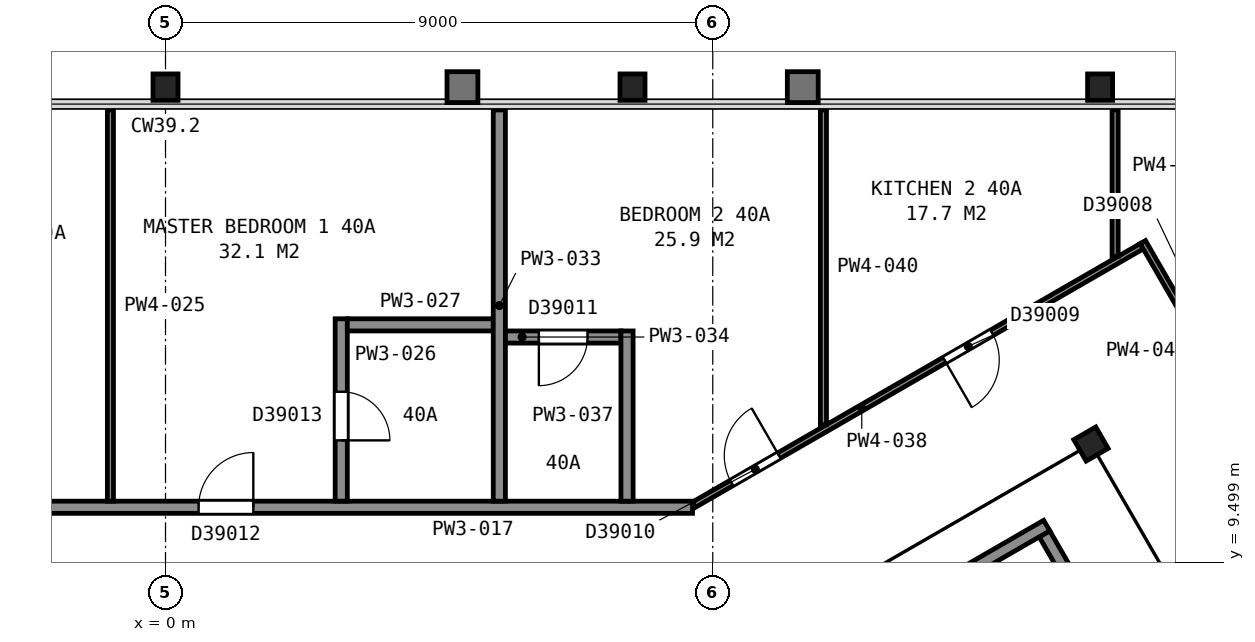
"""IFC4 building model, lengths in metres.
Left out: names, types, materials, properties, quantities, classifications, styles, units other than length and angle.
Written with IfcOpenShell. Run it as: python <this file> out.ifc"""

import sys

from ifc_helpers import new_model, si_unit, direction, frame, frame_2d, origin, origin_2d, place, context, subcontext, project, spatial, rectangle, i_section, extrude, element, fill, save


model = new_model("IFC4")
c1 = context("Model", 3, precision=1e-05, world=origin(), true_north=direction((0.0, 1.0)))
c2 = subcontext(c1, "Body", "Model", "MODEL_VIEW")
j1 = project(units=[si_unit("LENGTHUNIT", "METRE"), si_unit("PLANEANGLEUNIT", "RADIAN")], contexts=[c1])
p1 = place(None, origin())
s1 = spatial("IfcSite", under=j1, at=p1, CompositionType="ELEMENT")
p2 = place(p1, origin())
s2 = spatial("IfcBuilding", under=s1, at=p2, CompositionType="ELEMENT")
p3 = place(p2, frame((0.0, 0.0, 163.6)))
s3 = spatial("IfcBuildingStorey", under=s2, at=p3, CompositionType="ELEMENT", Elevation=163.6)
for number, where, z_axis, x_axis in (
    (1, (15.37, 17.31, 0.0), (0.0, 0.0, 1.0), (1.0, 0.0, 0.0)),
    (2, (7.68, 17.31, 0.0), (0.0, 0.0, 1.0), (1.0, 0.0, 0.0)),
    (3, (0.0, 17.31, 0.0), (0.0, 0.0, 1.0), (1.0, 0.0, 0.0)),
):
    element("IfcColumn", number, at=place(p3, frame(where, z_axis=z_axis, x_axis=x_axis)), inside=s3, PredefinedType="COLUMN", context=c2, shape_type="SweptSolid", body=[
        extrude(i_section(OverallWidth=0.411, OverallDepth=0.434, WebThickness=0.036, FlangeThickness=0.057, FilletRadius=0.015, at=origin_2d()), origin(), (0.0, 0.0, 1.0), 3.7),
    ])
p4 = place(p3, frame((15.22, 11.44, 0.0), z_axis=(0.0, 0.0, 1.0), x_axis=(0.5, -0.866025403784, 0.0)))
e4 = element("IfcColumn", 4, at=p4, inside=s3, PredefinedType="COLUMN", context=c2, shape_type="SweptSolid", body=[
    extrude(i_section(OverallWidth=0.406, OverallDepth=0.417, WebThickness=0.03, FlangeThickness=0.048, FilletRadius=0.015, at=origin_2d()), origin(), (0.0, 0.0, 1.0), 3.7),
])
p5 = place(p3, frame((15.855, 7.538, 0.0), z_axis=(0.0, 0.0, 1.0), x_axis=(-0.500049511043, 0.865996816683, 0.0)))
e5 = element("IfcWall", 5, at=p5, inside=s3, PredefinedType="PARTITIONING", context=c2, shape_type="SweptSolid", body=[
    extrude(rectangle(XDim=2.8, YDim=0.2, at=frame_2d((1.4, 0.0))), origin(), (0.0, 0.0, 1.0), 3.45),
])
p6 = place(p5, frame((0.85, 0.0, 0.0)))
e6 = element("IfcOpeningElement", 6, at=p6, cuts=e5, PredefinedType="OPENING", context=c2, shape_type="SweptSolid", body=[
    extrude(rectangle(XDim=1.1, YDim=2.1, at=frame_2d((0.55, 1.05))), frame((0.0, 0.11, 0.0), z_axis=(0.0, -1.0, 0.0), x_axis=(1.0, 0.0, 0.0)), (0.0, 0.0, 1.0), 0.22),
])
p7 = place(p3, frame((6.178, 5.299, 0.0), z_axis=(0.0, 0.0, 1.0), x_axis=(0.866019993635, 0.500009370536, 0.0)))
e7 = element("IfcWall", 7, at=p7, inside=s3, PredefinedType="PARTITIONING", context=c2, shape_type="SweptSolid", body=[
    extrude(rectangle(XDim=9.6, YDim=0.2, at=frame_2d((4.8, 0.0))), origin(), (0.0, 0.0, 1.0), 3.45),
])
p8 = place(p3, frame((-8.667, 10.4, 0.0), z_axis=(0.0, 0.0, 1.0), x_axis=(1.0, 0.0, 0.0)))
e8 = element("IfcWall", 8, at=p8, inside=s3, PredefinedType="PARTITIONING", context=c2, shape_type="SweptSolid", body=[
    extrude(rectangle(XDim=17.334, YDim=0.2, at=frame_2d((8.667, 0.0))), origin(), (0.0, 0.0, 1.0), 2.713),
])
p9 = place(p8, frame((9.211, 0.0, 0.0)))
e9 = element("IfcOpeningElement", 9, at=p9, cuts=e8, PredefinedType="OPENING", context=c2, shape_type="SweptSolid", body=[
    extrude(rectangle(XDim=0.9, YDim=2.1, at=frame_2d((0.45, 1.05))), frame((0.0, 0.11, 0.0), z_axis=(0.0, -1.0, 0.0), x_axis=(1.0, 0.0, 0.0)), (0.0, 0.0, 1.0), 0.22),
])
p10 = place(p8, frame((4.857, 0.0, 0.0)))
e10 = element("IfcOpeningElement", 10, at=p10, cuts=e8, PredefinedType="OPENING", context=c2, shape_type="SweptSolid", body=[
    extrude(rectangle(XDim=0.9, YDim=2.1, at=frame_2d((0.45, 1.05))), frame((0.0, 0.11, 0.0), z_axis=(0.0, -1.0, 0.0), x_axis=(1.0, 0.0, 0.0)), (0.0, 0.0, 1.0), 0.22),
])
p11 = place(p8, frame((1.0, 0.0, 0.0)))
e11 = element("IfcOpeningElement", 11, at=p11, cuts=e8, PredefinedType="OPENING", context=c2, shape_type="SweptSolid", body=[
    extrude(rectangle(XDim=0.9, YDim=2.1, at=frame_2d((0.45, 1.05))), frame((0.0, 0.11, 0.0), z_axis=(0.0, -1.0, 0.0), x_axis=(1.0, 0.0, 0.0)), (0.0, 0.0, 1.0), 0.22),
])
p12 = place(p3, frame((-0.906, 10.5, 0.0), z_axis=(0.0, 0.0, 1.0), x_axis=(0.0, 1.0, 0.0)))
e12 = element("IfcWall", 12, at=p12, inside=s3, PredefinedType="PARTITIONING", context=c2, shape_type="SweptSolid", body=[
    extrude(rectangle(XDim=6.435, YDim=0.1, at=frame_2d((3.218, 0.0))), origin(), (0.0, 0.0, 1.0), 2.713),
])
p13 = place(p3, frame((2.89, 13.5, 0.0), z_axis=(0.0, 0.0, 1.0), x_axis=(0.0, -1.0, 0.0)))
e13 = element("IfcWall", 13, at=p13, inside=s3, PredefinedType="PARTITIONING", context=c2, shape_type="SweptSolid", body=[
    extrude(rectangle(XDim=3.0, YDim=0.2, at=frame_2d((1.5, 0.0))), origin(), (0.0, 0.0, 1.0), 2.713),
])
p14 = place(p13, frame((1.2, 0.0, 0.0)))
e14 = element("IfcOpeningElement", 14, at=p14, cuts=e13, PredefinedType="OPENING", context=c2, shape_type="SweptSolid", body=[
    extrude(rectangle(XDim=0.8, YDim=2.1, at=frame_2d((0.4, 1.05))), frame((0.0, 0.11, 0.0), z_axis=(0.0, -1.0, 0.0), x_axis=(1.0, 0.0, 0.0)), (0.0, 0.0, 1.0), 0.22),
])
p15 = place(p3, frame((2.99, 13.4, 0.0), z_axis=(0.0, 0.0, 1.0), x_axis=(1.0, 0.0, 0.0)))
e15 = element("IfcWall", 15, at=p15, inside=s3, PredefinedType="PARTITIONING", context=c2, shape_type="SweptSolid", body=[
    extrude(rectangle(XDim=2.4, YDim=0.2, at=frame_2d((1.2, 0.0))), origin(), (0.0, 0.0, 1.0), 2.713),
])
p16 = place(p3, frame((5.49, 10.5, 0.0), z_axis=(0.0, 0.0, 1.0), x_axis=(0.0, 1.0, 0.0)))
e16 = element("IfcWall", 16, at=p16, inside=s3, PredefinedType="PARTITIONING", context=c2, shape_type="SweptSolid", body=[
    extrude(rectangle(XDim=6.435, YDim=0.2, at=frame_2d((3.218, 0.0))), origin(), (0.0, 0.0, 1.0), 2.713),
])
p17 = place(p3, frame((7.49, 13.2, 0.0), z_axis=(0.0, 0.0, 1.0), x_axis=(-1.0, 0.0, 0.0)))
e17 = element("IfcWall", 17, at=p17, inside=s3, PredefinedType="PARTITIONING", context=c2, shape_type="SweptSolid", body=[
    extrude(rectangle(XDim=1.9, YDim=0.2, at=frame_2d((0.95, 0.0))), origin(), (0.0, 0.0, 1.0), 2.713),
])
p18 = place(p17, frame((0.55, 0.0, 0.0)))
e18 = element("IfcOpeningElement", 18, at=p18, cuts=e17, PredefinedType="OPENING", context=c2, shape_type="SweptSolid", body=[
    extrude(rectangle(XDim=0.8, YDim=2.1, at=frame_2d((0.4, 1.05))), frame((0.0, 0.11, 0.0), z_axis=(0.0, -1.0, 0.0), x_axis=(1.0, 0.0, 0.0)), (0.0, 0.0, 1.0), 0.22),
])
p19 = place(p3, frame((7.59, 10.5, 0.0), z_axis=(0.0, 0.0, 1.0), x_axis=(0.0, 1.0, 0.0)))
e19 = element("IfcWall", 19, at=p19, inside=s3, PredefinedType="PARTITIONING", context=c2, shape_type="SweptSolid", body=[
    extrude(rectangle(XDim=2.8, YDim=0.2, at=frame_2d((1.4, 0.0))), origin(), (0.0, 0.0, 1.0), 2.713),
])
p20 = place(p3, frame((8.691, 10.442, 0.0), z_axis=(0.0, 0.0, 1.0), x_axis=(0.866070360466, 0.499922124658, 0.0)))
e20 = element("IfcWall", 20, at=p20, inside=s3, PredefinedType="PARTITIONING", context=c2, shape_type="SweptSolid", body=[
    extrude(rectangle(XDim=8.503, YDim=0.1, at=frame_2d((4.251, 0.0))), origin(), (0.0, 0.0, 1.0), 2.713),
])
p21 = place(p20, frame((4.758, 0.0, 0.0)))
e21 = element("IfcOpeningElement", 21, at=p21, cuts=e20, PredefinedType="OPENING", context=c2, shape_type="SweptSolid", body=[
    extrude(rectangle(XDim=0.9, YDim=2.1, at=frame_2d((0.45, 1.05))), frame((0.0, 0.06, 0.0), z_axis=(0.0, -1.0, 0.0), x_axis=(1.0, 0.0, 0.0)), (0.0, 0.0, 1.0), 0.12),
])
p22 = place(p20, frame((0.715, 0.0, 0.0)))
e22 = element("IfcOpeningElement", 22, at=p22, cuts=e20, PredefinedType="OPENING", context=c2, shape_type="SweptSolid", body=[
    extrude(rectangle(XDim=0.9, YDim=2.1, at=frame_2d((0.45, 1.05))), frame((0.0, 0.06, 0.0), z_axis=(0.0, -1.0, 0.0), x_axis=(1.0, 0.0, 0.0)), (0.0, 0.0, 1.0), 0.12),
])
p23 = place(p3, frame((10.82, 11.758, 0.0), z_axis=(0.0, 0.0, 1.0), x_axis=(0.0, 1.0, 0.0)))
e23 = element("IfcWall", 23, at=p23, inside=s3, PredefinedType="PARTITIONING", context=c2, shape_type="SweptSolid", body=[
    extrude(rectangle(XDim=5.177, YDim=0.1, at=frame_2d((2.589, 0.0))), origin(), (0.0, 0.0, 1.0), 2.713),
])
p24 = place(p3, frame((15.617, 14.527, 0.0), z_axis=(0.0, 0.0, 1.0), x_axis=(0.0, 1.0, 0.0)))
e24 = element("IfcWall", 24, at=p24, inside=s3, PredefinedType="PARTITIONING", context=c2, shape_type="SweptSolid", body=[
    extrude(rectangle(XDim=2.408, YDim=0.1, at=frame_2d((1.204, 0.0))), origin(), (0.0, 0.0, 1.0), 2.713),
])
p25 = place(p3, frame((16.073, 14.761, 0.0), z_axis=(0.0, 0.0, 1.0), x_axis=(0.500297300687, -0.865853689098, 0.0)))
e25 = element("IfcWall", 25, at=p25, inside=s3, PredefinedType="PARTITIONING", context=c2, shape_type="SweptSolid", body=[
    extrude(rectangle(XDim=9.496, YDim=0.1, at=frame_2d((4.748, 0.0))), origin(), (0.0, 0.0, 1.0), 2.713),
])
p26 = place(p25, frame((4.15, 0.0, 0.0)))
e26 = element("IfcOpeningElement", 26, at=p26, cuts=e25, PredefinedType="OPENING", context=c2, shape_type="SweptSolid", body=[
    extrude(rectangle(XDim=1.2, YDim=2.1, at=frame_2d((0.6, 1.05))), frame((0.0, 0.06, 0.0), z_axis=(0.0, -1.0, 0.0), x_axis=(1.0, 0.0, 0.0)), (0.0, 0.0, 1.0), 0.12),
])
p27 = place(p9, origin())
e27 = element("IfcDoor", 27, at=p27, inside=s3, OperationType="SINGLE_SWING_RIGHT", PredefinedType="DOOR", context=c2, shape_type="SweptSolid", body=[
    extrude(rectangle(XDim=0.9, YDim=2.1, at=frame_2d((0.45, 1.05))), frame((0.0, 0.025, 0.0), z_axis=(0.0, -1.0, 0.0), x_axis=(1.0, 0.0, 0.0)), (0.0, 0.0, 1.0), 0.05),
])
fill(e9, e27)
p28 = place(p14, origin())
e28 = element("IfcDoor", 28, at=p28, inside=s3, OperationType="SINGLE_SWING_RIGHT", PredefinedType="DOOR", context=c2, shape_type="SweptSolid", body=[
    extrude(rectangle(XDim=0.8, YDim=2.1, at=frame_2d((0.4, 1.05))), frame((0.0, 0.025, 0.0), z_axis=(0.0, -1.0, 0.0), x_axis=(1.0, 0.0, 0.0)), (0.0, 0.0, 1.0), 0.05),
])
fill(e14, e28)
p29 = place(p18, origin())
e29 = element("IfcDoor", 29, at=p29, inside=s3, OperationType="SINGLE_SWING_RIGHT", PredefinedType="DOOR", context=c2, shape_type="SweptSolid", body=[
    extrude(rectangle(XDim=0.8, YDim=2.1, at=frame_2d((0.4, 1.05))), frame((0.0, 0.025, 0.0), z_axis=(0.0, -1.0, 0.0), x_axis=(1.0, 0.0, 0.0)), (0.0, 0.0, 1.0), 0.05),
])
fill(e18, e29)
p30 = place(p21, origin())
e30 = element("IfcDoor", 30, at=p30, inside=s3, OperationType="SINGLE_SWING_LEFT", PredefinedType="DOOR", context=c2, shape_type="SweptSolid", body=[
    extrude(rectangle(XDim=0.9, YDim=2.1, at=frame_2d((0.45, 1.05))), frame((0.0, 0.025, 0.0), z_axis=(0.0, -1.0, 0.0), x_axis=(1.0, 0.0, 0.0)), (0.0, 0.0, 1.0), 0.05),
])
fill(e21, e30)
p31 = place(p22, origin())
e31 = element("IfcDoor", 31, at=p31, inside=s3, OperationType="SINGLE_SWING_RIGHT", PredefinedType="DOOR", context=c2, shape_type="SweptSolid", body=[
    extrude(rectangle(XDim=0.9, YDim=2.1, at=frame_2d((0.45, 1.05))), frame((0.0, 0.025, 0.0), z_axis=(0.0, -1.0, 0.0), x_axis=(1.0, 0.0, 0.0)), (0.0, 0.0, 1.0), 0.05),
])
fill(e22, e31)
save(model, sys.argv[1])
